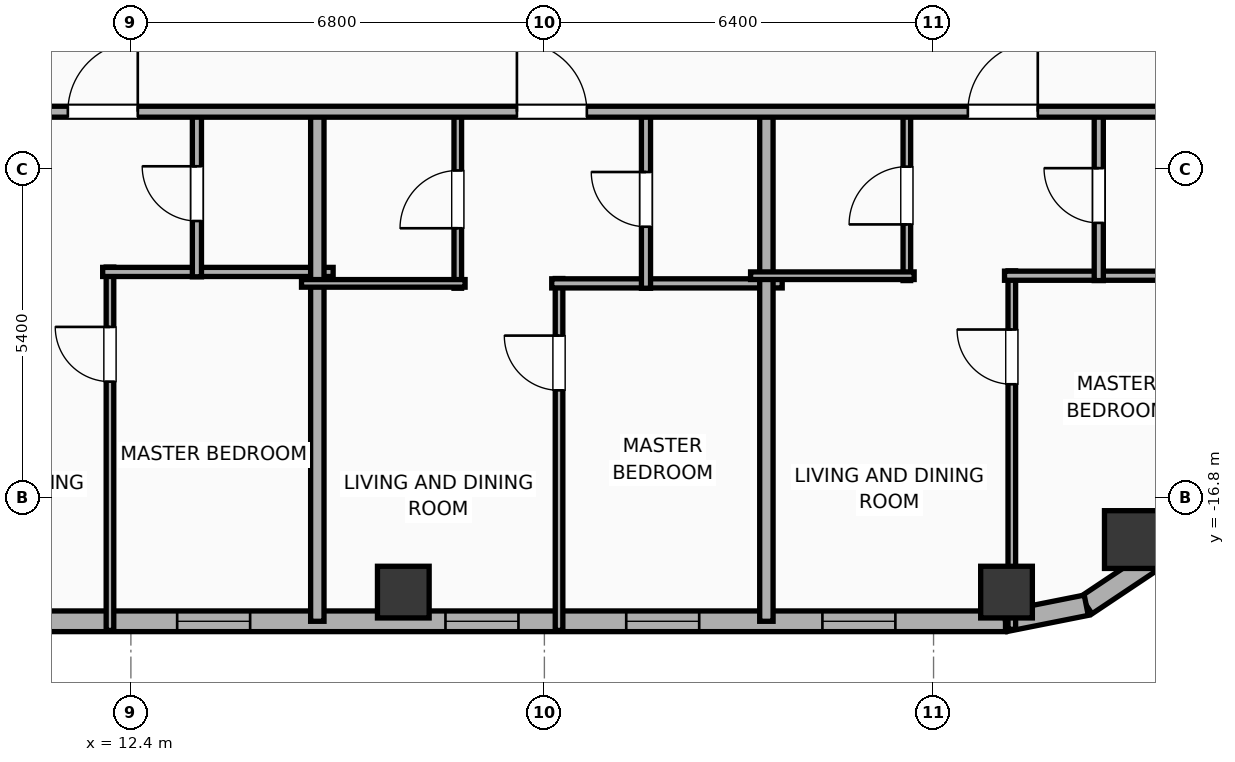
"""IFC4 building model, lengths in metres.
Left out: names, types, materials, properties, quantities, classifications, styles, units other than length and angle.
Written with IfcOpenShell. Run it as: python <this file> out.ifc"""

import sys

from ifc_helpers import new_model, si_unit, direction, frame, frame_2d, origin, origin_2d, place, context, subcontext, project, spatial, rectangle, hollow_rectangle, hollow_circle, extrude, element, fill, save


model = new_model("IFC4")
c1 = context("Model", 3, precision=1e-05, world=origin(), true_north=direction((0.0, 1.0)))
c2 = subcontext(c1, "Body", "Model", "MODEL_VIEW")
j1 = project(units=[si_unit("LENGTHUNIT", "METRE"), si_unit("PLANEANGLEUNIT", "RADIAN")], contexts=[c1])
p1 = place(None, origin())
s1 = spatial("IfcSite", under=j1, at=p1, CompositionType="ELEMENT")
p2 = place(p1, origin())
s2 = spatial("IfcBuilding", under=s1, at=p2, CompositionType="ELEMENT")
p3 = place(p2, frame((0.0, 0.0, 239.2)))
s3 = spatial("IfcBuildingStorey", under=s2, at=p3, CompositionType="ELEMENT", Elevation=239.2)
for number, where, z_axis, x_axis in (
    (1, (16.88, -18.35, 0.0), (0.0, 0.0, 1.0), (1.0, 0.0, 0.0)),
    (2, (26.8, -18.35, 0.0), (0.0, 0.0, 1.0), (1.0, 0.0, 0.0)),
):
    element("IfcColumn", number, at=place(p3, frame(where, z_axis=z_axis, x_axis=x_axis)), inside=s3, PredefinedType="COLUMN", context=c2, shape_type="SweptSolid", body=[
        extrude(hollow_rectangle(XDim=0.85, YDim=0.85, WallThickness=0.028, at=origin_2d()), origin(), (0.0, 0.0, 1.0), 3.9),
    ])
p4 = place(p3, frame((28.886, -17.486, 0.0), z_axis=(0.0, 0.0, 1.0), x_axis=(1.0, 0.0, 0.0)))
e3 = element("IfcColumn", 3, at=p4, inside=s3, PredefinedType="COLUMN", context=c2, shape_type="SweptSolid", body=[
    extrude(hollow_circle(Radius=0.475, WallThickness=0.032, at=origin_2d()), origin(), (0.0, 0.0, 1.0), 3.9),
])
p5 = place(p3, frame((26.783, -18.83, 0.0), z_axis=(0.0, 0.0, 1.0), x_axis=(-1.0, 0.0, 0.0)))
e4 = element("IfcWall", 4, at=p5, inside=s3, PredefinedType="ELEMENTEDWALL", context=c2, shape_type="SweptSolid", body=[
    extrude(rectangle(XDim=49.566, YDim=0.34, at=frame_2d((24.783, 0.0))), origin(), (0.0, 0.0, 1.0), 3.65),
])
p6 = place(p5, frame((23.583, 0.0, 0.75)))
e5 = element("IfcOpeningElement", 5, at=p6, cuts=e4, PredefinedType="OPENING", context=c2, shape_type="SweptSolid", body=[
    extrude(rectangle(XDim=2.4, YDim=2.1, at=frame_2d((1.2, 1.05))), frame((0.0, 0.18, 0.0), z_axis=(0.0, -1.0, 0.0), x_axis=(1.0, 0.0, 0.0)), (0.0, 0.0, 1.0), 0.36),
])
p7 = place(p5, frame((41.756, 0.0, 0.75)))
e6 = element("IfcOpeningElement", 6, at=p7, cuts=e4, PredefinedType="OPENING", context=c2, shape_type="SweptSolid", body=[
    extrude(rectangle(XDim=2.4, YDim=2.1, at=frame_2d((1.2, 1.05))), frame((0.0, 0.18, 0.0), z_axis=(0.0, -1.0, 0.0), x_axis=(1.0, 0.0, 0.0)), (0.0, 0.0, 1.0), 0.36),
])
p8 = place(p5, frame((47.222, 0.0, 0.75)))
e7 = element("IfcOpeningElement", 7, at=p8, cuts=e4, PredefinedType="OPENING", context=c2, shape_type="SweptSolid", body=[
    extrude(rectangle(XDim=1.2, YDim=2.05, at=frame_2d((0.6, 1.025))), frame((0.0, 0.18, 0.0), z_axis=(0.0, -1.0, 0.0), x_axis=(1.0, 0.0, 0.0)), (0.0, 0.0, 1.0), 0.36),
])
p9 = place(p5, frame((45.263, 0.0, 0.75)))
e8 = element("IfcOpeningElement", 8, at=p9, cuts=e4, PredefinedType="OPENING", context=c2, shape_type="SweptSolid", body=[
    extrude(rectangle(XDim=1.2, YDim=2.05, at=frame_2d((0.6, 1.025))), frame((0.0, 0.18, 0.0), z_axis=(0.0, -1.0, 0.0), x_axis=(1.0, 0.0, 0.0)), (0.0, 0.0, 1.0), 0.36),
])
p10 = place(p5, frame((37.289, 0.0, 0.75)))
e9 = element("IfcOpeningElement", 9, at=p10, cuts=e4, PredefinedType="OPENING", context=c2, shape_type="SweptSolid", body=[
    extrude(rectangle(XDim=1.2, YDim=2.05, at=frame_2d((0.6, 1.025))), frame((0.0, 0.18, 0.0), z_axis=(0.0, -1.0, 0.0), x_axis=(1.0, 0.0, 0.0)), (0.0, 0.0, 1.0), 0.36),
])
p11 = place(p5, frame((16.115, 0.0, 0.75)))
e10 = element("IfcOpeningElement", 10, at=p11, cuts=e4, PredefinedType="OPENING", context=c2, shape_type="SweptSolid", body=[
    extrude(rectangle(XDim=1.2, YDim=2.05, at=frame_2d((0.6, 1.025))), frame((0.0, 0.18, 0.0), z_axis=(0.0, -1.0, 0.0), x_axis=(1.0, 0.0, 0.0)), (0.0, 0.0, 1.0), 0.36),
])
p12 = place(p5, frame((12.422, 0.0, 0.75)))
e11 = element("IfcOpeningElement", 11, at=p12, cuts=e4, PredefinedType="OPENING", context=c2, shape_type="SweptSolid", body=[
    extrude(rectangle(XDim=1.2, YDim=2.05, at=frame_2d((0.6, 1.025))), frame((0.0, 0.18, 0.0), z_axis=(0.0, -1.0, 0.0), x_axis=(1.0, 0.0, 0.0)), (0.0, 0.0, 1.0), 0.36),
])
p13 = place(p5, frame((8.01, 0.0, 0.75)))
e12 = element("IfcOpeningElement", 12, at=p13, cuts=e4, PredefinedType="OPENING", context=c2, shape_type="SweptSolid", body=[
    extrude(rectangle(XDim=1.2, YDim=2.05, at=frame_2d((0.6, 1.025))), frame((0.0, 0.18, 0.0), z_axis=(0.0, -1.0, 0.0), x_axis=(1.0, 0.0, 0.0)), (0.0, 0.0, 1.0), 0.36),
])
p14 = place(p5, frame((5.037, 0.0, 0.75)))
e13 = element("IfcOpeningElement", 13, at=p14, cuts=e4, PredefinedType="OPENING", context=c2, shape_type="SweptSolid", body=[
    extrude(rectangle(XDim=1.2, YDim=2.05, at=frame_2d((0.6, 1.025))), frame((0.0, 0.18, 0.0), z_axis=(0.0, -1.0, 0.0), x_axis=(1.0, 0.0, 0.0)), (0.0, 0.0, 1.0), 0.36),
])
p15 = place(p5, frame((1.811, 0.0, 0.75)))
e14 = element("IfcOpeningElement", 14, at=p15, cuts=e4, PredefinedType="OPENING", context=c2, shape_type="SweptSolid", body=[
    extrude(rectangle(XDim=1.2, YDim=2.05, at=frame_2d((0.6, 1.025))), frame((0.0, 0.18, 0.0), z_axis=(0.0, -1.0, 0.0), x_axis=(1.0, 0.0, 0.0)), (0.0, 0.0, 1.0), 0.36),
])
p16 = place(p5, frame((32.253, 0.0, 0.75)))
e15 = element("IfcOpeningElement", 15, at=p16, cuts=e4, PredefinedType="OPENING", context=c2, shape_type="SweptSolid", body=[
    extrude(rectangle(XDim=1.2, YDim=2.05, at=frame_2d((0.6, 1.025))), frame((0.0, 0.18, 0.0), z_axis=(0.0, -1.0, 0.0), x_axis=(1.0, 0.0, 0.0)), (0.0, 0.0, 1.0), 0.36),
])
p17 = place(p5, frame((27.853, 0.0, 0.75)))
e16 = element("IfcOpeningElement", 16, at=p17, cuts=e4, PredefinedType="OPENING", context=c2, shape_type="SweptSolid", body=[
    extrude(rectangle(XDim=1.2, YDim=2.05, at=frame_2d((0.6, 1.025))), frame((0.0, 0.18, 0.0), z_axis=(0.0, -1.0, 0.0), x_axis=(1.0, 0.0, 0.0)), (0.0, 0.0, 1.0), 0.36),
])
p18 = place(p5, frame((20.473, 0.0, 0.75)))
e17 = element("IfcOpeningElement", 17, at=p18, cuts=e4, PredefinedType="OPENING", context=c2, shape_type="SweptSolid", body=[
    extrude(rectangle(XDim=1.2, YDim=2.05, at=frame_2d((0.6, 1.025))), frame((0.0, 0.18, 0.0), z_axis=(0.0, -1.0, 0.0), x_axis=(1.0, 0.0, 0.0)), (0.0, 0.0, 1.0), 0.36),
])
p19 = place(p3, frame((29.966, -16.711, 0.0), z_axis=(0.0, 0.0, 1.0), x_axis=(-0.555584683399, -0.831459956686, 0.0)))
e18 = element("IfcWall", 18, at=p19, inside=s3, PredefinedType="ELEMENTEDWALL", context=c2, shape_type="SweptSolid", body=[
    extrude(rectangle(XDim=1.337, YDim=0.34, at=frame_2d((0.668, 0.0))), origin(), (0.0, 0.0, 1.0), 3.65),
])
p20 = place(p3, frame((29.223, -17.823, 0.0), z_axis=(0.0, 0.0, 1.0), x_axis=(-0.831403586725, -0.555669034571, 0.0)))
e19 = element("IfcWall", 19, at=p20, inside=s3, PredefinedType="ELEMENTEDWALL", context=c2, shape_type="SweptSolid", body=[
    extrude(rectangle(XDim=1.337, YDim=0.34, at=frame_2d((0.668, 0.0))), origin(), (0.0, 0.0, 1.0), 3.65),
])
p21 = place(p3, frame((28.111, -18.566, 0.0), z_axis=(0.0, 0.0, 1.0), x_axis=(-0.980788153188, -0.195075878998, 0.0)))
e20 = element("IfcWall", 20, at=p21, inside=s3, PredefinedType="ELEMENTEDWALL", context=c2, shape_type="SweptSolid", body=[
    extrude(rectangle(XDim=1.354, YDim=0.34, at=frame_2d((0.677, 0.0))), origin(), (0.0, 0.0, 1.0), 3.65),
])
p22 = place(p3, frame((12.056, -18.98, 0.0), z_axis=(0.0, 0.0, 1.0), x_axis=(0.0, 1.0, 0.0)))
e21 = element("IfcWall", 21, at=p22, inside=s3, PredefinedType="PARTITIONING", context=c2, shape_type="SweptSolid", body=[
    extrude(rectangle(XDim=5.975, YDim=0.125, at=frame_2d((2.988, 0.0))), origin(), (0.0, 0.0, 1.0), 3.65),
])
p23 = place(p22, frame((4.091, 0.0, 0.0)))
e22 = element("IfcOpeningElement", 22, at=p23, cuts=e21, PredefinedType="OPENING", context=c2, shape_type="SweptSolid", body=[
    extrude(rectangle(XDim=0.9, YDim=2.05, at=frame_2d((0.45, 1.025))), frame((0.0, 0.073, 0.0), z_axis=(0.0, -1.0, 0.0), x_axis=(1.0, 0.0, 0.0)), (0.0, 0.0, 1.0), 0.145),
])
p24 = place(p3, frame((11.936, -13.085, 0.0), z_axis=(0.0, 0.0, 1.0), x_axis=(1.0, 0.0, 0.0)))
e23 = element("IfcWall", 23, at=p24, inside=s3, PredefinedType="PLUMBINGWALL", context=c2, shape_type="SweptSolid", body=[
    extrude(rectangle(XDim=3.79, YDim=0.15, at=frame_2d((1.895, 0.0))), origin(), (0.0, 0.0, 1.0), 3.65),
])
p25 = place(p3, frame((13.486, -13.165, 0.0), z_axis=(0.0, 0.0, 1.0), x_axis=(0.0, 1.0, 0.0)))
e24 = element("IfcWall", 24, at=p25, inside=s3, PredefinedType="PLUMBINGWALL", context=c2, shape_type="SweptSolid", body=[
    extrude(rectangle(XDim=2.735, YDim=0.15, at=frame_2d((1.368, 0.0))), origin(), (0.0, 0.0, 1.0), 3.65),
])
p26 = place(p25, frame((0.917, 0.0, 0.0)))
e25 = element("IfcOpeningElement", 25, at=p26, cuts=e24, PredefinedType="OPENING", context=c2, shape_type="SweptSolid", body=[
    extrude(rectangle(XDim=0.9, YDim=2.05, at=frame_2d((0.45, 1.025))), frame((0.0, 0.085, 0.0), z_axis=(0.0, -1.0, 0.0), x_axis=(1.0, 0.0, 0.0)), (0.0, 0.0, 1.0), 0.17),
])
p27 = place(p3, frame((15.466, -18.83, 0.0), z_axis=(0.0, 0.0, 1.0), x_axis=(0.0, 1.0, 0.0)))
e26 = element("IfcWall", 26, at=p27, inside=s3, PredefinedType="PARTITIONING", context=c2, shape_type="SweptSolid", body=[
    extrude(rectangle(XDim=8.46, YDim=0.22, at=frame_2d((4.23, 0.0))), origin(), (0.0, 0.0, 1.0), 3.65),
])
p28 = place(p3, frame((19.441, -18.98, 0.0), z_axis=(0.0, 0.0, 1.0), x_axis=(0.0, 1.0, 0.0)))
e27 = element("IfcWall", 27, at=p28, inside=s3, PredefinedType="PARTITIONING", context=c2, shape_type="SweptSolid", body=[
    extrude(rectangle(XDim=5.787, YDim=0.125, at=frame_2d((2.894, 0.0))), origin(), (0.0, 0.0, 1.0), 3.65),
])
p29 = place(p28, frame((3.948, 0.0, 0.0)))
e28 = element("IfcOpeningElement", 28, at=p29, cuts=e27, PredefinedType="OPENING", context=c2, shape_type="SweptSolid", body=[
    extrude(rectangle(XDim=0.9, YDim=2.05, at=frame_2d((0.45, 1.025))), frame((0.0, 0.073, 0.0), z_axis=(0.0, -1.0, 0.0), x_axis=(1.0, 0.0, 0.0)), (0.0, 0.0, 1.0), 0.145),
])
p30 = place(p3, frame((19.321, -13.273, 0.0), z_axis=(0.0, 0.0, 1.0), x_axis=(1.0, 0.0, 0.0)))
e29 = element("IfcWall", 29, at=p30, inside=s3, PredefinedType="PLUMBINGWALL", context=c2, shape_type="SweptSolid", body=[
    extrude(rectangle(XDim=3.79, YDim=0.15, at=frame_2d((1.895, 0.0))), origin(), (0.0, 0.0, 1.0), 3.65),
])
p31 = place(p3, frame((17.776, -13.353, 0.0), z_axis=(0.0, 0.0, 1.0), x_axis=(0.0, 1.0, 0.0)))
e30 = element("IfcWall", 30, at=p31, inside=s3, PredefinedType="PARTITIONING", context=c2, shape_type="SweptSolid", body=[
    extrude(rectangle(XDim=2.923, YDim=0.125, at=frame_2d((1.461, 0.0))), origin(), (0.0, 0.0, 1.0), 3.65),
])
p32 = place(p31, frame((0.987, 0.0, 0.0)))
e31 = element("IfcOpeningElement", 31, at=p32, cuts=e30, PredefinedType="OPENING", context=c2, shape_type="SweptSolid", body=[
    extrude(rectangle(XDim=0.95, YDim=2.05, at=frame_2d((0.475, 1.025))), frame((0.0, 0.073, 0.0), z_axis=(0.0, -1.0, 0.0), x_axis=(1.0, 0.0, 0.0)), (0.0, 0.0, 1.0), 0.145),
])
p33 = place(p3, frame((15.206, -13.273, 0.0), z_axis=(0.0, 0.0, 1.0), x_axis=(1.0, 0.0, 0.0)))
e32 = element("IfcWall", 32, at=p33, inside=s3, PredefinedType="PARTITIONING", context=c2, shape_type="SweptSolid", body=[
    extrude(rectangle(XDim=2.69, YDim=0.125, at=frame_2d((1.345, 0.0))), origin(), (0.0, 0.0, 1.0), 3.65),
])
p34 = place(p3, frame((20.871, -13.353, 0.0), z_axis=(0.0, 0.0, 1.0), x_axis=(0.0, 1.0, 0.0)))
e33 = element("IfcWall", 33, at=p34, inside=s3, PredefinedType="PLUMBINGWALL", context=c2, shape_type="SweptSolid", body=[
    extrude(rectangle(XDim=2.923, YDim=0.15, at=frame_2d((1.461, 0.0))), origin(), (0.0, 0.0, 1.0), 3.65),
])
p35 = place(p34, frame((1.011, 0.0, 0.0)))
e34 = element("IfcOpeningElement", 34, at=p35, cuts=e33, PredefinedType="OPENING", context=c2, shape_type="SweptSolid", body=[
    extrude(rectangle(XDim=0.9, YDim=2.05, at=frame_2d((0.45, 1.025))), frame((0.0, 0.085, 0.0), z_axis=(0.0, -1.0, 0.0), x_axis=(1.0, 0.0, 0.0)), (0.0, 0.0, 1.0), 0.17),
])
p36 = place(p3, frame((22.851, -18.83, 0.0), z_axis=(0.0, 0.0, 1.0), x_axis=(0.0, 1.0, 0.0)))
e35 = element("IfcWall", 35, at=p36, inside=s3, PredefinedType="PARTITIONING", context=c2, shape_type="SweptSolid", body=[
    extrude(rectangle(XDim=8.46, YDim=0.22, at=frame_2d((4.23, 0.0))), origin(), (0.0, 0.0, 1.0), 3.65),
])
p37 = place(p3, frame((26.887, -18.962, 0.0), z_axis=(0.0, 0.0, 1.0), x_axis=(0.0, 1.0, 0.0)))
e36 = element("IfcWall", 36, at=p37, inside=s3, PredefinedType="PARTITIONING", context=c2, shape_type="SweptSolid", body=[
    extrude(rectangle(XDim=5.896, YDim=0.125, at=frame_2d((2.948, 0.0))), origin(), (0.0, 0.0, 1.0), 3.65),
])
p38 = place(p37, frame((4.031, 0.0, 0.0)))
e37 = element("IfcOpeningElement", 37, at=p38, cuts=e36, PredefinedType="OPENING", context=c2, shape_type="SweptSolid", body=[
    extrude(rectangle(XDim=0.9, YDim=2.05, at=frame_2d((0.45, 1.025))), frame((0.0, 0.073, 0.0), z_axis=(0.0, -1.0, 0.0), x_axis=(1.0, 0.0, 0.0)), (0.0, 0.0, 1.0), 0.145),
])
p39 = place(p3, frame((26.767, -13.147, 0.0), z_axis=(0.0, 0.0, 1.0), x_axis=(1.0, 0.0, 0.0)))
e38 = element("IfcWall", 38, at=p39, inside=s3, PredefinedType="PLUMBINGWALL", context=c2, shape_type="SweptSolid", body=[
    extrude(rectangle(XDim=3.613, YDim=0.15, at=frame_2d((1.806, 0.0))), origin(), (0.0, 0.0, 1.0), 3.65),
])
p40 = place(p3, frame((25.161, -13.227, 0.0), z_axis=(0.0, 0.0, 1.0), x_axis=(0.0, 1.0, 0.0)))
e39 = element("IfcWall", 39, at=p40, inside=s3, PredefinedType="PARTITIONING", context=c2, shape_type="SweptSolid", body=[
    extrude(rectangle(XDim=2.797, YDim=0.125, at=frame_2d((1.398, 0.0))), origin(), (0.0, 0.0, 1.0), 3.65),
])
p41 = place(p40, frame((0.924, 0.0, 0.0)))
e40 = element("IfcOpeningElement", 40, at=p41, cuts=e39, PredefinedType="OPENING", context=c2, shape_type="SweptSolid", body=[
    extrude(rectangle(XDim=0.95, YDim=2.05, at=frame_2d((0.475, 1.025))), frame((0.0, 0.073, 0.0), z_axis=(0.0, -1.0, 0.0), x_axis=(1.0, 0.0, 0.0)), (0.0, 0.0, 1.0), 0.145),
])
p42 = place(p3, frame((22.591, -13.147, 0.0), z_axis=(0.0, 0.0, 1.0), x_axis=(1.0, 0.0, 0.0)))
e41 = element("IfcWall", 41, at=p42, inside=s3, PredefinedType="PARTITIONING", context=c2, shape_type="SweptSolid", body=[
    extrude(rectangle(XDim=2.69, YDim=0.125, at=frame_2d((1.345, 0.0))), origin(), (0.0, 0.0, 1.0), 3.65),
])
p43 = place(p3, frame((28.317, -13.227, 0.0), z_axis=(0.0, 0.0, 1.0), x_axis=(0.0, 1.0, 0.0)))
e42 = element("IfcWall", 42, at=p43, inside=s3, PredefinedType="PLUMBINGWALL", context=c2, shape_type="SweptSolid", body=[
    extrude(rectangle(XDim=2.797, YDim=0.15, at=frame_2d((1.398, 0.0))), origin(), (0.0, 0.0, 1.0), 3.65),
])
p44 = place(p43, frame((0.948, 0.0, 0.0)))
e43 = element("IfcOpeningElement", 43, at=p44, cuts=e42, PredefinedType="OPENING", context=c2, shape_type="SweptSolid", body=[
    extrude(rectangle(XDim=0.9, YDim=2.05, at=frame_2d((0.45, 1.025))), frame((0.0, 0.085, 0.0), z_axis=(0.0, -1.0, 0.0), x_axis=(1.0, 0.0, 0.0)), (0.0, 0.0, 1.0), 0.17),
])
p45 = place(p3, frame((8.08, -10.45, 0.0), z_axis=(0.0, 0.0, 1.0), x_axis=(1.0, 0.0, 0.0)))
e44 = element("IfcWall", 44, at=p45, inside=s3, PredefinedType="PARTITIONING", context=c2, shape_type="SweptSolid", body=[
    extrude(rectangle(XDim=22.15, YDim=0.18, at=frame_2d((11.075, 0.0))), origin(), (0.0, 0.0, 1.0), 3.65),
])
p46 = place(p45, frame((3.283, 0.0, 0.0)))
e45 = element("IfcOpeningElement", 45, at=p46, cuts=e44, PredefinedType="OPENING", context=c2, shape_type="SweptSolid", body=[
    extrude(rectangle(XDim=1.15, YDim=2.05, at=frame_2d((0.575, 1.025))), frame((0.0, 0.1, 0.0), z_axis=(0.0, -1.0, 0.0), x_axis=(1.0, 0.0, 0.0)), (0.0, 0.0, 1.0), 0.2),
])
p47 = place(p45, frame((10.668, 0.0, 0.0)))
e46 = element("IfcOpeningElement", 46, at=p47, cuts=e44, PredefinedType="OPENING", context=c2, shape_type="SweptSolid", body=[
    extrude(rectangle(XDim=1.15, YDim=2.05, at=frame_2d((0.575, 1.025))), frame((0.0, 0.1, 0.0), z_axis=(0.0, -1.0, 0.0), x_axis=(1.0, 0.0, 0.0)), (0.0, 0.0, 1.0), 0.2),
])
p48 = place(p45, frame((18.084, 0.0, 0.0)))
e47 = element("IfcOpeningElement", 47, at=p48, cuts=e44, PredefinedType="OPENING", context=c2, shape_type="SweptSolid", body=[
    extrude(rectangle(XDim=1.15, YDim=2.05, at=frame_2d((0.575, 1.025))), frame((0.0, 0.1, 0.0), z_axis=(0.0, -1.0, 0.0), x_axis=(1.0, 0.0, 0.0)), (0.0, 0.0, 1.0), 0.2),
])
p49 = place(p12, origin())
e48 = element("IfcWindow", 48, at=p49, inside=s3, PartitioningType="SINGLE_PANEL", PredefinedType="WINDOW", context=c2, shape_type="SweptSolid", body=[
    extrude(rectangle(XDim=1.2, YDim=2.05, at=frame_2d((0.6, 1.025))), frame((0.0, 0.03, 0.0), z_axis=(0.0, -1.0, 0.0), x_axis=(1.0, 0.0, 0.0)), (0.0, 0.0, 1.0), 0.06),
])
fill(e11, e48)
p50 = place(p13, origin())
e49 = element("IfcWindow", 49, at=p50, inside=s3, PartitioningType="SINGLE_PANEL", PredefinedType="WINDOW", context=c2, shape_type="SweptSolid", body=[
    extrude(rectangle(XDim=1.2, YDim=2.05, at=frame_2d((0.6, 1.025))), frame((0.0, 0.03, 0.0), z_axis=(0.0, -1.0, 0.0), x_axis=(1.0, 0.0, 0.0)), (0.0, 0.0, 1.0), 0.06),
])
fill(e12, e49)
p51 = place(p14, origin())
e50 = element("IfcWindow", 50, at=p51, inside=s3, PartitioningType="SINGLE_PANEL", PredefinedType="WINDOW", context=c2, shape_type="SweptSolid", body=[
    extrude(rectangle(XDim=1.2, YDim=2.05, at=frame_2d((0.6, 1.025))), frame((0.0, 0.03, 0.0), z_axis=(0.0, -1.0, 0.0), x_axis=(1.0, 0.0, 0.0)), (0.0, 0.0, 1.0), 0.06),
])
fill(e13, e50)
p52 = place(p15, origin())
e51 = element("IfcWindow", 51, at=p52, inside=s3, PartitioningType="SINGLE_PANEL", PredefinedType="WINDOW", context=c2, shape_type="SweptSolid", body=[
    extrude(rectangle(XDim=1.2, YDim=2.05, at=frame_2d((0.6, 1.025))), frame((0.0, 0.03, 0.0), z_axis=(0.0, -1.0, 0.0), x_axis=(1.0, 0.0, 0.0)), (0.0, 0.0, 1.0), 0.06),
])
fill(e14, e51)
p53 = place(p23, origin())
e52 = element("IfcDoor", 52, at=p53, inside=s3, OperationType="SINGLE_SWING_RIGHT", PredefinedType="DOOR", context=c2, shape_type="SweptSolid", body=[
    extrude(rectangle(XDim=0.9, YDim=2.05, at=frame_2d((0.45, 1.025))), frame((0.0, 0.025, 0.0), z_axis=(0.0, -1.0, 0.0), x_axis=(1.0, 0.0, 0.0)), (0.0, 0.0, 1.0), 0.05),
])
fill(e22, e52)
p54 = place(p26, origin())
e53 = element("IfcDoor", 53, at=p54, inside=s3, OperationType="SINGLE_SWING_RIGHT", PredefinedType="DOOR", context=c2, shape_type="SweptSolid", body=[
    extrude(rectangle(XDim=0.9, YDim=2.05, at=frame_2d((0.45, 1.025))), frame((0.0, 0.025, 0.0), z_axis=(0.0, -1.0, 0.0), x_axis=(1.0, 0.0, 0.0)), (0.0, 0.0, 1.0), 0.05),
])
fill(e25, e53)
p55 = place(p29, origin())
e54 = element("IfcDoor", 54, at=p55, inside=s3, OperationType="SINGLE_SWING_RIGHT", PredefinedType="DOOR", context=c2, shape_type="SweptSolid", body=[
    extrude(rectangle(XDim=0.9, YDim=2.05, at=frame_2d((0.45, 1.025))), frame((0.0, 0.025, 0.0), z_axis=(0.0, -1.0, 0.0), x_axis=(1.0, 0.0, 0.0)), (0.0, 0.0, 1.0), 0.05),
])
fill(e28, e54)
p56 = place(p32, origin())
e55 = element("IfcDoor", 55, at=p56, inside=s3, OperationType="SINGLE_SWING_LEFT", PredefinedType="DOOR", context=c2, shape_type="SweptSolid", body=[
    extrude(rectangle(XDim=0.95, YDim=2.05, at=frame_2d((0.475, 1.025))), frame((0.0, 0.025, 0.0), z_axis=(0.0, -1.0, 0.0), x_axis=(1.0, 0.0, 0.0)), (0.0, 0.0, 1.0), 0.05),
])
fill(e31, e55)
p57 = place(p35, origin())
e56 = element("IfcDoor", 56, at=p57, inside=s3, OperationType="SINGLE_SWING_RIGHT", PredefinedType="DOOR", context=c2, shape_type="SweptSolid", body=[
    extrude(rectangle(XDim=0.9, YDim=2.05, at=frame_2d((0.45, 1.025))), frame((0.0, 0.025, 0.0), z_axis=(0.0, -1.0, 0.0), x_axis=(1.0, 0.0, 0.0)), (0.0, 0.0, 1.0), 0.05),
])
fill(e34, e56)
p58 = place(p38, origin())
e57 = element("IfcDoor", 57, at=p58, inside=s3, OperationType="SINGLE_SWING_RIGHT", PredefinedType="DOOR", context=c2, shape_type="SweptSolid", body=[
    extrude(rectangle(XDim=0.9, YDim=2.05, at=frame_2d((0.45, 1.025))), frame((0.0, 0.025, 0.0), z_axis=(0.0, -1.0, 0.0), x_axis=(1.0, 0.0, 0.0)), (0.0, 0.0, 1.0), 0.05),
])
fill(e37, e57)
p59 = place(p41, origin())
e58 = element("IfcDoor", 58, at=p59, inside=s3, OperationType="SINGLE_SWING_LEFT", PredefinedType="DOOR", context=c2, shape_type="SweptSolid", body=[
    extrude(rectangle(XDim=0.95, YDim=2.05, at=frame_2d((0.475, 1.025))), frame((0.0, 0.025, 0.0), z_axis=(0.0, -1.0, 0.0), x_axis=(1.0, 0.0, 0.0)), (0.0, 0.0, 1.0), 0.05),
])
fill(e40, e58)
p60 = place(p44, origin())
e59 = element("IfcDoor", 59, at=p60, inside=s3, OperationType="SINGLE_SWING_RIGHT", PredefinedType="DOOR", context=c2, shape_type="SweptSolid", body=[
    extrude(rectangle(XDim=0.9, YDim=2.05, at=frame_2d((0.45, 1.025))), frame((0.0, 0.025, 0.0), z_axis=(0.0, -1.0, 0.0), x_axis=(1.0, 0.0, 0.0)), (0.0, 0.0, 1.0), 0.05),
])
fill(e43, e59)
p61 = place(p46, origin())
e60 = element("IfcDoor", 60, at=p61, inside=s3, OperationType="SINGLE_SWING_RIGHT", PredefinedType="DOOR", context=c2, shape_type="SweptSolid", body=[
    extrude(rectangle(XDim=1.15, YDim=2.05, at=frame_2d((0.575, 1.025))), frame((0.0, 0.025, 0.0), z_axis=(0.0, -1.0, 0.0), x_axis=(1.0, 0.0, 0.0)), (0.0, 0.0, 1.0), 0.05),
])
fill(e45, e60)
p62 = place(p47, origin())
e61 = element("IfcDoor", 61, at=p62, inside=s3, OperationType="SINGLE_SWING_LEFT", PredefinedType="DOOR", context=c2, shape_type="SweptSolid", body=[
    extrude(rectangle(XDim=1.15, YDim=2.05, at=frame_2d((0.575, 1.025))), frame((0.0, 0.025, 0.0), z_axis=(0.0, -1.0, 0.0), x_axis=(1.0, 0.0, 0.0)), (0.0, 0.0, 1.0), 0.05),
])
fill(e46, e61)
p63 = place(p48, origin())
e62 = element("IfcDoor", 62, at=p63, inside=s3, OperationType="SINGLE_SWING_RIGHT", PredefinedType="DOOR", context=c2, shape_type="SweptSolid", body=[
    extrude(rectangle(XDim=1.15, YDim=2.05, at=frame_2d((0.575, 1.025))), frame((0.0, 0.025, 0.0), z_axis=(0.0, -1.0, 0.0), x_axis=(1.0, 0.0, 0.0)), (0.0, 0.0, 1.0), 0.05),
])
fill(e47, e62)
save(model, sys.argv[1])
